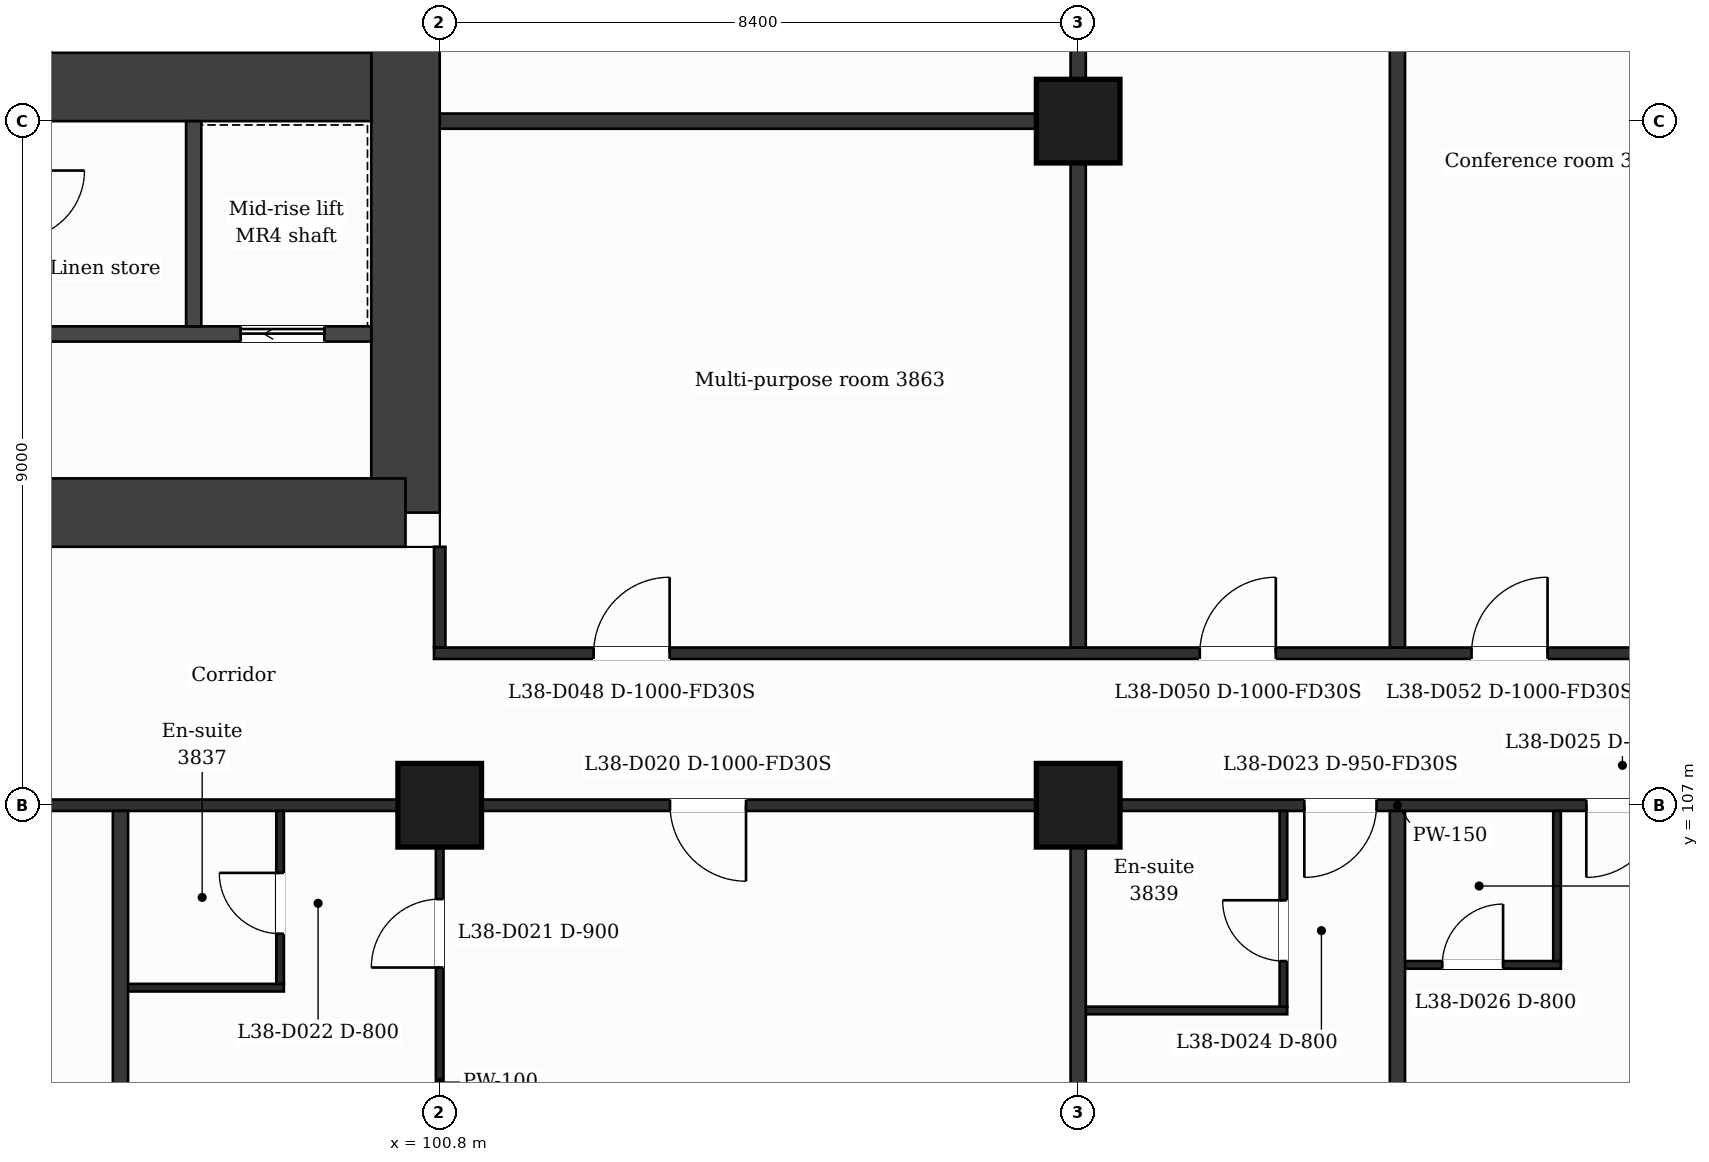
"""IFC4 building model, lengths in metres.
Left out: names, types, materials, properties, quantities, classifications, styles, units other than length and angle.
Written with IfcOpenShell. Run it as: python <this file> out.ifc"""

import sys

from ifc_helpers import new_model, si_unit, direction, frame, frame_2d, origin, origin_2d, place, context, subcontext, project, spatial, rectangle, extrude, element, fill, save


model = new_model("IFC4")
c1 = context("Model", 3, precision=1e-05, world=origin(), true_north=direction((0.0, 1.0)))
c2 = subcontext(c1, "Body", "Model", "MODEL_VIEW")
j1 = project(units=[si_unit("LENGTHUNIT", "METRE"), si_unit("PLANEANGLEUNIT", "RADIAN")], contexts=[c1])
p1 = place(None, origin())
s1 = spatial("IfcSite", under=j1, at=p1, CompositionType="ELEMENT")
p2 = place(p1, origin())
s2 = spatial("IfcBuilding", under=s1, at=p2, CompositionType="ELEMENT")
p3 = place(p2, frame((0.0, 0.0, 162.6)))
s3 = spatial("IfcBuildingStorey", under=s2, at=p3, CompositionType="ELEMENT", Elevation=162.6)
p4 = place(p3, frame((100.35, 131.95, 0.0), z_axis=(0.0, 0.0, 1.0), x_axis=(0.0, -1.0, 0.0)))
e1 = element("IfcWall", 1, at=p4, inside=s3, PredefinedType="SHEAR", context=c2, shape_type="SweptSolid", body=[
    extrude(rectangle(XDim=21.1, YDim=0.9, at=frame_2d((10.55, 0.0))), origin(), (0.0, 0.0, 1.0), 3.7),
])
p5 = place(p3, frame((100.35, 110.85, 0.0), z_axis=(0.0, 0.0, 1.0), x_axis=(-1.0, 0.0, 0.0)))
e2 = element("IfcWall", 2, at=p5, inside=s3, PredefinedType="SHEAR", context=c2, shape_type="SweptSolid", body=[
    extrude(rectangle(XDim=14.166, YDim=0.9, at=frame_2d((7.083, 0.0))), origin(), (0.0, 0.0, 1.0), 3.7),
])
p6 = place(p5, frame((5.855, 0.0, 0.0)))
e3 = element("IfcOpeningElement", 3, at=p6, cuts=e2, PredefinedType="OPENING", context=c2, shape_type="SweptSolid", body=[
    extrude(rectangle(XDim=1.4, YDim=2.1, at=frame_2d((0.7, 1.05))), frame((0.0, 0.46, 0.0), z_axis=(0.0, -1.0, 0.0), x_axis=(1.0, 0.0, 0.0)), (0.0, 0.0, 1.0), 0.92),
])
p7 = place(p3, frame((94.8, 116.45, 0.0), z_axis=(0.0, 0.0, 1.0), x_axis=(1.0, 0.0, 0.0)))
e4 = element("IfcWall", 4, at=p7, inside=s3, PredefinedType="SHEAR", context=c2, shape_type="SweptSolid", body=[
    extrude(rectangle(XDim=5.1, YDim=0.9, at=frame_2d((2.55, 0.0))), origin(), (0.0, 0.0, 1.0), 3.7),
])
for number, where, z_axis, x_axis in (
    (5, (100.8, 107.0, 0.0), (0.0, 0.0, 1.0), (1.0, 0.0, 0.0)),
    (6, (109.2, 107.0, 0.0), (0.0, 0.0, 1.0), (1.0, 0.0, 0.0)),
    (7, (109.2, 116.0, 0.0), (0.0, 0.0, 1.0), (1.0, 0.0, 0.0)),
):
    element("IfcColumn", number, at=place(p3, frame(where, z_axis=z_axis, x_axis=x_axis)), inside=s3, PredefinedType="COLUMN", context=c2, shape_type="SweptSolid", body=[
        extrude(rectangle(XDim=1.1, YDim=1.1, at=origin_2d()), origin(), (0.0, 0.0, 1.0), 3.7),
    ])
p8 = place(p3, frame((109.2, 104.3, 0.0), z_axis=(0.0, 0.0, 1.0), x_axis=(1.0, 0.0, 0.0)))
e8 = element("IfcWall", 8, at=p8, inside=s3, PredefinedType="PARTITIONING", context=c2, shape_type="SweptSolid", body=[
    extrude(rectangle(XDim=2.75, YDim=0.1, at=frame_2d((1.375, 0.0))), origin(), (0.0, 0.0, 1.0), 3.38),
])
p9 = place(p3, frame((96.6, 104.6, 0.0), z_axis=(0.0, 0.0, 1.0), x_axis=(1.0, 0.0, 0.0)))
e9 = element("IfcWall", 9, at=p9, inside=s3, PredefinedType="PARTITIONING", context=c2, shape_type="SweptSolid", body=[
    extrude(rectangle(XDim=2.15, YDim=0.1, at=frame_2d((1.075, 0.0))), origin(), (0.0, 0.0, 1.0), 3.38),
])
p10 = place(p3, frame((113.4, 104.9, 0.0), z_axis=(0.0, 0.0, 1.0), x_axis=(1.0, 0.0, 0.0)))
e10 = element("IfcWall", 10, at=p10, inside=s3, PredefinedType="PARTITIONING", context=c2, shape_type="SweptSolid", body=[
    extrude(rectangle(XDim=2.15, YDim=0.1, at=frame_2d((1.075, 0.0))), origin(), (0.0, 0.0, 1.0), 3.38),
])
p11 = place(p10, frame((0.59, 0.0, 0.0)))
e11 = element("IfcOpeningElement", 11, at=p11, cuts=e10, PredefinedType="OPENING", context=c2, shape_type="SweptSolid", body=[
    extrude(rectangle(XDim=0.8, YDim=2.1, at=frame_2d((0.4, 1.05))), frame((0.0, 0.06, 0.0), z_axis=(0.0, -1.0, 0.0), x_axis=(1.0, 0.0, 0.0)), (0.0, 0.0, 1.0), 0.12),
])
p12 = place(p3, frame((87.018, 107.0, 0.0), z_axis=(0.0, 0.0, 1.0), x_axis=(1.0, 0.0, 0.0)))
e12 = element("IfcWall", 12, at=p12, inside=s3, PredefinedType="PARTITIONING", context=c2, shape_type="SweptSolid", body=[
    extrude(rectangle(XDim=52.765, YDim=0.15, at=frame_2d((26.382, 0.0))), origin(), (0.0, 0.0, 1.0), 3.38),
])
p13 = place(p12, frame((1.032, 0.0, 0.0)))
e13 = element("IfcOpeningElement", 13, at=p13, cuts=e12, PredefinedType="OPENING", context=c2, shape_type="SweptSolid", body=[
    extrude(rectangle(XDim=0.95, YDim=2.1, at=frame_2d((0.475, 1.05))), frame((0.0, 0.085, 0.0), z_axis=(0.0, -1.0, 0.0), x_axis=(1.0, 0.0, 0.0)), (0.0, 0.0, 1.0), 0.17),
])
p14 = place(p12, frame((6.369, 0.0, 0.0)))
e14 = element("IfcOpeningElement", 14, at=p14, cuts=e12, PredefinedType="OPENING", context=c2, shape_type="SweptSolid", body=[
    extrude(rectangle(XDim=0.95, YDim=2.1, at=frame_2d((0.475, 1.05))), frame((0.0, 0.085, 0.0), z_axis=(0.0, -1.0, 0.0), x_axis=(1.0, 0.0, 0.0)), (0.0, 0.0, 1.0), 0.17),
])
p15 = place(p12, frame((16.812, 0.0, 0.0)))
e15 = element("IfcOpeningElement", 15, at=p15, cuts=e12, PredefinedType="OPENING", context=c2, shape_type="SweptSolid", body=[
    extrude(rectangle(XDim=1.0, YDim=2.1, at=frame_2d((0.5, 1.05))), frame((0.0, 0.085, 0.0), z_axis=(0.0, -1.0, 0.0), x_axis=(1.0, 0.0, 0.0)), (0.0, 0.0, 1.0), 0.17),
])
p16 = place(p12, frame((25.157, 0.0, 0.0)))
e16 = element("IfcOpeningElement", 16, at=p16, cuts=e12, PredefinedType="OPENING", context=c2, shape_type="SweptSolid", body=[
    extrude(rectangle(XDim=0.95, YDim=2.1, at=frame_2d((0.475, 1.05))), frame((0.0, 0.085, 0.0), z_axis=(0.0, -1.0, 0.0), x_axis=(1.0, 0.0, 0.0)), (0.0, 0.0, 1.0), 0.17),
])
p17 = place(p12, frame((28.867, 0.0, 0.0)))
e17 = element("IfcOpeningElement", 17, at=p17, cuts=e12, PredefinedType="OPENING", context=c2, shape_type="SweptSolid", body=[
    extrude(rectangle(XDim=0.95, YDim=2.1, at=frame_2d((0.475, 1.05))), frame((0.0, 0.085, 0.0), z_axis=(0.0, -1.0, 0.0), x_axis=(1.0, 0.0, 0.0)), (0.0, 0.0, 1.0), 0.17),
])
p18 = place(p12, frame((34.952, 0.0, 0.0)))
e18 = element("IfcOpeningElement", 18, at=p18, cuts=e12, PredefinedType="OPENING", context=c2, shape_type="SweptSolid", body=[
    extrude(rectangle(XDim=1.0, YDim=2.1, at=frame_2d((0.5, 1.05))), frame((0.0, 0.085, 0.0), z_axis=(0.0, -1.0, 0.0), x_axis=(1.0, 0.0, 0.0)), (0.0, 0.0, 1.0), 0.17),
])
p19 = place(p12, frame((45.632, 0.0, 0.0)))
e19 = element("IfcOpeningElement", 19, at=p19, cuts=e12, PredefinedType="OPENING", context=c2, shape_type="SweptSolid", body=[
    extrude(rectangle(XDim=0.95, YDim=2.1, at=frame_2d((0.475, 1.05))), frame((0.0, 0.085, 0.0), z_axis=(0.0, -1.0, 0.0), x_axis=(1.0, 0.0, 0.0)), (0.0, 0.0, 1.0), 0.17),
])
p20 = place(p12, frame((48.56, 0.0, 0.0)))
e20 = element("IfcOpeningElement", 20, at=p20, cuts=e12, PredefinedType="OPENING", context=c2, shape_type="SweptSolid", body=[
    extrude(rectangle(XDim=0.95, YDim=2.1, at=frame_2d((0.475, 1.05))), frame((0.0, 0.085, 0.0), z_axis=(0.0, -1.0, 0.0), x_axis=(1.0, 0.0, 0.0)), (0.0, 0.0, 1.0), 0.17),
])
p21 = place(p3, frame((100.725, 109.0, 0.0), z_axis=(0.0, 0.0, 1.0), x_axis=(1.0, 0.0, 0.0)))
e21 = element("IfcWall", 21, at=p21, inside=s3, PredefinedType="PARTITIONING", context=c2, shape_type="SweptSolid", body=[
    extrude(rectangle(XDim=25.35, YDim=0.15, at=frame_2d((12.675, 0.0))), origin(), (0.0, 0.0, 1.0), 3.38),
])
p22 = place(p21, frame((2.1, 0.0, 0.0)))
e22 = element("IfcOpeningElement", 22, at=p22, cuts=e21, PredefinedType="OPENING", context=c2, shape_type="SweptSolid", body=[
    extrude(rectangle(XDim=1.0, YDim=2.1, at=frame_2d((0.5, 1.05))), frame((0.0, 0.085, 0.0), z_axis=(0.0, -1.0, 0.0), x_axis=(1.0, 0.0, 0.0)), (0.0, 0.0, 1.0), 0.17),
])
p23 = place(p21, frame((10.075, 0.0, 0.0)))
e23 = element("IfcOpeningElement", 23, at=p23, cuts=e21, PredefinedType="OPENING", context=c2, shape_type="SweptSolid", body=[
    extrude(rectangle(XDim=1.0, YDim=2.1, at=frame_2d((0.5, 1.05))), frame((0.0, 0.085, 0.0), z_axis=(0.0, -1.0, 0.0), x_axis=(1.0, 0.0, 0.0)), (0.0, 0.0, 1.0), 0.17),
])
p24 = place(p21, frame((13.65, 0.0, 0.0)))
e24 = element("IfcOpeningElement", 24, at=p24, cuts=e21, PredefinedType="OPENING", context=c2, shape_type="SweptSolid", body=[
    extrude(rectangle(XDim=1.0, YDim=2.1, at=frame_2d((0.5, 1.05))), frame((0.0, 0.085, 0.0), z_axis=(0.0, -1.0, 0.0), x_axis=(1.0, 0.0, 0.0)), (0.0, 0.0, 1.0), 0.17),
])
p25 = place(p21, frame((18.475, 0.0, 0.0)))
e25 = element("IfcOpeningElement", 25, at=p25, cuts=e21, PredefinedType="OPENING", context=c2, shape_type="SweptSolid", body=[
    extrude(rectangle(XDim=1.0, YDim=2.1, at=frame_2d((0.5, 1.05))), frame((0.0, 0.085, 0.0), z_axis=(0.0, -1.0, 0.0), x_axis=(1.0, 0.0, 0.0)), (0.0, 0.0, 1.0), 0.17),
])
p26 = place(p21, frame((22.05, 0.0, 0.0)))
e26 = element("IfcOpeningElement", 26, at=p26, cuts=e21, PredefinedType="OPENING", context=c2, shape_type="SweptSolid", body=[
    extrude(rectangle(XDim=1.0, YDim=2.1, at=frame_2d((0.5, 1.05))), frame((0.0, 0.085, 0.0), z_axis=(0.0, -1.0, 0.0), x_axis=(1.0, 0.0, 0.0)), (0.0, 0.0, 1.0), 0.17),
])
p27 = place(p3, frame((95.127, 113.2, 0.0), z_axis=(0.0, 0.0, 1.0), x_axis=(1.0, 0.0, 0.0)))
e27 = element("IfcWall", 27, at=p27, inside=s3, PredefinedType="PARTITIONING", context=c2, shape_type="SweptSolid", body=[
    extrude(rectangle(XDim=4.773, YDim=0.2, at=frame_2d((2.386, 0.0))), origin(), (0.0, 0.0, 1.0), 3.38),
])
p28 = place(p27, frame((3.055, 0.0, 0.0)))
e28 = element("IfcOpeningElement", 28, at=p28, cuts=e27, PredefinedType="OPENING", context=c2, shape_type="SweptSolid", body=[
    extrude(rectangle(XDim=1.1, YDim=2.1, at=frame_2d((0.55, 1.05))), frame((0.0, 0.11, 0.0), z_axis=(0.0, -1.0, 0.0), x_axis=(1.0, 0.0, 0.0)), (0.0, 0.0, 1.0), 0.22),
])
p29 = place(p3, frame((100.8, 116.0, 0.0), z_axis=(0.0, 0.0, 1.0), x_axis=(1.0, 0.0, 0.0)))
e29 = element("IfcWall", 29, at=p29, inside=s3, PredefinedType="PARTITIONING", context=c2, shape_type="SweptSolid", body=[
    extrude(rectangle(XDim=8.4, YDim=0.2, at=frame_2d((4.2, 0.0))), origin(), (0.0, 0.0, 1.0), 3.38),
])
p30 = place(p3, frame((96.6, 99.79, 0.0), z_axis=(0.0, 0.0, 1.0), x_axis=(0.0, 1.0, 0.0)))
e30 = element("IfcWall", 30, at=p30, inside=s3, PredefinedType="PARTITIONING", context=c2, shape_type="SweptSolid", body=[
    extrude(rectangle(XDim=7.135, YDim=0.2, at=frame_2d((3.567, 0.0))), origin(), (0.0, 0.0, 1.0), 3.38),
])
p31 = place(p3, frame((97.563, 113.3, 0.0), z_axis=(0.0, 0.0, 1.0), x_axis=(0.0, 1.0, 0.0)))
e31 = element("IfcWall", 31, at=p31, inside=s3, PredefinedType="PARTITIONING", context=c2, shape_type="SweptSolid", body=[
    extrude(rectangle(XDim=2.7, YDim=0.2, at=frame_2d((1.35, 0.0))), origin(), (0.0, 0.0, 1.0), 3.38),
])
p32 = place(p3, frame((98.7, 104.65, 0.0), z_axis=(0.0, 0.0, 1.0), x_axis=(0.0, 1.0, 0.0)))
e32 = element("IfcWall", 32, at=p32, inside=s3, PredefinedType="PARTITIONING", context=c2, shape_type="SweptSolid", body=[
    extrude(rectangle(XDim=2.275, YDim=0.1, at=frame_2d((1.138, 0.0))), origin(), (0.0, 0.0, 1.0), 3.38),
])
p33 = place(p32, frame((0.66, 0.0, 0.0)))
e33 = element("IfcOpeningElement", 33, at=p33, cuts=e32, PredefinedType="OPENING", context=c2, shape_type="SweptSolid", body=[
    extrude(rectangle(XDim=0.8, YDim=2.1, at=frame_2d((0.4, 1.05))), frame((0.0, 0.06, 0.0), z_axis=(0.0, -1.0, 0.0), x_axis=(1.0, 0.0, 0.0)), (0.0, 0.0, 1.0), 0.12),
])
p34 = place(p3, frame((100.8, 99.79, 0.0), z_axis=(0.0, 0.0, 1.0), x_axis=(0.0, 1.0, 0.0)))
e34 = element("IfcWall", 34, at=p34, inside=s3, PredefinedType="PARTITIONING", context=c2, shape_type="SweptSolid", body=[
    extrude(rectangle(XDim=7.135, YDim=0.1, at=frame_2d((3.567, 0.0))), origin(), (0.0, 0.0, 1.0), 3.38),
])
p35 = place(p34, frame((5.075, 0.0, 0.0)))
e35 = element("IfcOpeningElement", 35, at=p35, cuts=e34, PredefinedType="OPENING", context=c2, shape_type="SweptSolid", body=[
    extrude(rectangle(XDim=0.9, YDim=2.1, at=frame_2d((0.45, 1.05))), frame((0.0, 0.06, 0.0), z_axis=(0.0, -1.0, 0.0), x_axis=(1.0, 0.0, 0.0)), (0.0, 0.0, 1.0), 0.12),
])
p36 = place(p3, frame((100.8, 109.075, 0.0), z_axis=(0.0, 0.0, 1.0), x_axis=(0.0, 1.0, 0.0)))
e36 = element("IfcWall", 36, at=p36, inside=s3, PredefinedType="PARTITIONING", context=c2, shape_type="SweptSolid", body=[
    extrude(rectangle(XDim=1.325, YDim=0.15, at=frame_2d((0.663, 0.0))), origin(), (0.0, 0.0, 1.0), 3.38),
])
p37 = place(p3, frame((109.2, 99.79, 0.0), z_axis=(0.0, 0.0, 1.0), x_axis=(0.0, 1.0, 0.0)))
e37 = element("IfcWall", 37, at=p37, inside=s3, PredefinedType="PARTITIONING", context=c2, shape_type="SweptSolid", body=[
    extrude(rectangle(XDim=7.135, YDim=0.2, at=frame_2d((3.567, 0.0))), origin(), (0.0, 0.0, 1.0), 3.38),
])
p38 = place(p3, frame((109.2, 109.075, 0.0), z_axis=(0.0, 0.0, 1.0), x_axis=(0.0, 1.0, 0.0)))
e38 = element("IfcWall", 38, at=p38, inside=s3, PredefinedType="PARTITIONING", context=c2, shape_type="SweptSolid", body=[
    extrude(rectangle(XDim=24.65, YDim=0.2, at=frame_2d((12.325, 0.0))), origin(), (0.0, 0.0, 1.0), 3.38),
])
p39 = place(p3, frame((111.9, 104.35, 0.0), z_axis=(0.0, 0.0, 1.0), x_axis=(0.0, 1.0, 0.0)))
e39 = element("IfcWall", 39, at=p39, inside=s3, PredefinedType="PARTITIONING", context=c2, shape_type="SweptSolid", body=[
    extrude(rectangle(XDim=2.575, YDim=0.1, at=frame_2d((1.288, 0.0))), origin(), (0.0, 0.0, 1.0), 3.38),
])
p40 = place(p39, frame((0.6, 0.0, 0.0)))
e40 = element("IfcOpeningElement", 40, at=p40, cuts=e39, PredefinedType="OPENING", context=c2, shape_type="SweptSolid", body=[
    extrude(rectangle(XDim=0.8, YDim=2.1, at=frame_2d((0.4, 1.05))), frame((0.0, 0.06, 0.0), z_axis=(0.0, -1.0, 0.0), x_axis=(1.0, 0.0, 0.0)), (0.0, 0.0, 1.0), 0.12),
])
p41 = place(p3, frame((113.4, 99.79, 0.0), z_axis=(0.0, 0.0, 1.0), x_axis=(0.0, 1.0, 0.0)))
e41 = element("IfcWall", 41, at=p41, inside=s3, PredefinedType="PARTITIONING", context=c2, shape_type="SweptSolid", body=[
    extrude(rectangle(XDim=7.135, YDim=0.2, at=frame_2d((3.567, 0.0))), origin(), (0.0, 0.0, 1.0), 3.38),
])
p42 = place(p3, frame((113.4, 109.075, 0.0), z_axis=(0.0, 0.0, 1.0), x_axis=(0.0, 1.0, 0.0)))
e42 = element("IfcWall", 42, at=p42, inside=s3, PredefinedType="PARTITIONING", context=c2, shape_type="SweptSolid", body=[
    extrude(rectangle(XDim=24.65, YDim=0.2, at=frame_2d((12.325, 0.0))), origin(), (0.0, 0.0, 1.0), 3.38),
])
p43 = place(p3, frame((115.5, 104.95, 0.0), z_axis=(0.0, 0.0, 1.0), x_axis=(0.0, 1.0, 0.0)))
e43 = element("IfcWall", 43, at=p43, inside=s3, PredefinedType="PARTITIONING", context=c2, shape_type="SweptSolid", body=[
    extrude(rectangle(XDim=1.975, YDim=0.1, at=frame_2d((0.988, 0.0))), origin(), (0.0, 0.0, 1.0), 3.38),
])
p44 = place(p28, origin())
e44 = element("IfcDoor", 44, at=p44, inside=s3, OperationType="SLIDING_TO_LEFT", PredefinedType="DOOR", context=c2, shape_type="SweptSolid", body=[
    extrude(rectangle(XDim=1.1, YDim=2.1, at=frame_2d((0.55, 1.05))), frame((0.0, 0.025, 0.0), z_axis=(0.0, -1.0, 0.0), x_axis=(1.0, 0.0, 0.0)), (0.0, 0.0, 1.0), 0.05),
])
fill(e28, e44)
p45 = place(p15, origin())
e45 = element("IfcDoor", 45, at=p45, inside=s3, OperationType="SINGLE_SWING_RIGHT", PredefinedType="DOOR", context=c2, shape_type="SweptSolid", body=[
    extrude(rectangle(XDim=1.0, YDim=2.1, at=frame_2d((0.5, 1.05))), frame((0.0, 0.025, 0.0), z_axis=(0.0, -1.0, 0.0), x_axis=(1.0, 0.0, 0.0)), (0.0, 0.0, 1.0), 0.05),
])
fill(e15, e45)
p46 = place(p35, origin())
e46 = element("IfcDoor", 46, at=p46, inside=s3, OperationType="SINGLE_SWING_LEFT", PredefinedType="DOOR", context=c2, shape_type="SweptSolid", body=[
    extrude(rectangle(XDim=0.9, YDim=2.1, at=frame_2d((0.45, 1.05))), frame((0.0, 0.025, 0.0), z_axis=(0.0, -1.0, 0.0), x_axis=(1.0, 0.0, 0.0)), (0.0, 0.0, 1.0), 0.05),
])
fill(e35, e46)
p47 = place(p33, origin())
e47 = element("IfcDoor", 47, at=p47, inside=s3, OperationType="SINGLE_SWING_RIGHT", PredefinedType="DOOR", context=c2, shape_type="SweptSolid", body=[
    extrude(rectangle(XDim=0.8, YDim=2.1, at=frame_2d((0.4, 1.05))), frame((0.0, 0.025, 0.0), z_axis=(0.0, -1.0, 0.0), x_axis=(1.0, 0.0, 0.0)), (0.0, 0.0, 1.0), 0.05),
])
fill(e33, e47)
p48 = place(p16, origin())
e48 = element("IfcDoor", 48, at=p48, inside=s3, OperationType="SINGLE_SWING_LEFT", PredefinedType="DOOR", context=c2, shape_type="SweptSolid", body=[
    extrude(rectangle(XDim=0.95, YDim=2.1, at=frame_2d((0.475, 1.05))), frame((0.0, 0.025, 0.0), z_axis=(0.0, -1.0, 0.0), x_axis=(1.0, 0.0, 0.0)), (0.0, 0.0, 1.0), 0.05),
])
fill(e16, e48)
p49 = place(p40, origin())
e49 = element("IfcDoor", 49, at=p49, inside=s3, OperationType="SINGLE_SWING_RIGHT", PredefinedType="DOOR", context=c2, shape_type="SweptSolid", body=[
    extrude(rectangle(XDim=0.8, YDim=2.1, at=frame_2d((0.4, 1.05))), frame((0.0, 0.025, 0.0), z_axis=(0.0, -1.0, 0.0), x_axis=(1.0, 0.0, 0.0)), (0.0, 0.0, 1.0), 0.05),
])
fill(e40, e49)
p50 = place(p17, origin())
e50 = element("IfcDoor", 50, at=p50, inside=s3, OperationType="SINGLE_SWING_LEFT", PredefinedType="DOOR", context=c2, shape_type="SweptSolid", body=[
    extrude(rectangle(XDim=0.95, YDim=2.1, at=frame_2d((0.475, 1.05))), frame((0.0, 0.025, 0.0), z_axis=(0.0, -1.0, 0.0), x_axis=(1.0, 0.0, 0.0)), (0.0, 0.0, 1.0), 0.05),
])
fill(e17, e50)
p51 = place(p11, origin())
e51 = element("IfcDoor", 51, at=p51, inside=s3, OperationType="SINGLE_SWING_RIGHT", PredefinedType="DOOR", context=c2, shape_type="SweptSolid", body=[
    extrude(rectangle(XDim=0.8, YDim=2.1, at=frame_2d((0.4, 1.05))), frame((0.0, 0.025, 0.0), z_axis=(0.0, -1.0, 0.0), x_axis=(1.0, 0.0, 0.0)), (0.0, 0.0, 1.0), 0.05),
])
fill(e11, e51)
p52 = place(p22, origin())
e52 = element("IfcDoor", 52, at=p52, inside=s3, OperationType="SINGLE_SWING_RIGHT", PredefinedType="DOOR", context=c2, shape_type="SweptSolid", body=[
    extrude(rectangle(XDim=1.0, YDim=2.1, at=frame_2d((0.5, 1.05))), frame((0.0, 0.025, 0.0), z_axis=(0.0, -1.0, 0.0), x_axis=(1.0, 0.0, 0.0)), (0.0, 0.0, 1.0), 0.05),
])
fill(e22, e52)
p53 = place(p23, origin())
e53 = element("IfcDoor", 53, at=p53, inside=s3, OperationType="SINGLE_SWING_RIGHT", PredefinedType="DOOR", context=c2, shape_type="SweptSolid", body=[
    extrude(rectangle(XDim=1.0, YDim=2.1, at=frame_2d((0.5, 1.05))), frame((0.0, 0.025, 0.0), z_axis=(0.0, -1.0, 0.0), x_axis=(1.0, 0.0, 0.0)), (0.0, 0.0, 1.0), 0.05),
])
fill(e23, e53)
p54 = place(p24, origin())
e54 = element("IfcDoor", 54, at=p54, inside=s3, OperationType="SINGLE_SWING_RIGHT", PredefinedType="DOOR", context=c2, shape_type="SweptSolid", body=[
    extrude(rectangle(XDim=1.0, YDim=2.1, at=frame_2d((0.5, 1.05))), frame((0.0, 0.025, 0.0), z_axis=(0.0, -1.0, 0.0), x_axis=(1.0, 0.0, 0.0)), (0.0, 0.0, 1.0), 0.05),
])
fill(e24, e54)
save(model, sys.argv[1])
